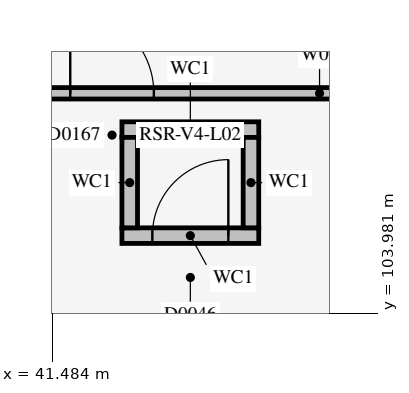
"""IFC4 building model, lengths in metres.
Left out: names, types, materials, properties, quantities, classifications, styles, units other than length and angle.
Written with IfcOpenShell. Run it as: python <this file> out.ifc"""

import sys

from ifc_helpers import new_model, si_unit, direction, frame, frame_2d, origin, place, context, subcontext, project, spatial, rectangle, extrude, element, fill, save


model = new_model("IFC4")
c1 = context("Model", 3, precision=1e-05, world=origin(), true_north=direction((0.0, 1.0)))
c2 = subcontext(c1, "Body", "Model", "MODEL_VIEW")
j1 = project(units=[si_unit("LENGTHUNIT", "METRE"), si_unit("PLANEANGLEUNIT", "RADIAN")], contexts=[c1])
p1 = place(None, origin())
s1 = spatial("IfcSite", under=j1, at=p1, CompositionType="ELEMENT")
p2 = place(p1, origin())
s2 = spatial("IfcBuilding", under=s1, at=p2, CompositionType="ELEMENT")
p3 = place(p2, frame((0.0, 0.0, 10.2)))
s3 = spatial("IfcBuildingStorey", under=s2, at=p3, CompositionType="ELEMENT", Elevation=10.2)
p4 = place(p3, frame((42.4, 105.002, 0.0), z_axis=(0.0, 0.0, 1.0), x_axis=(1.0, 0.0, 0.0)))
e1 = element("IfcWall", 1, at=p4, inside=s3, PredefinedType="SOLIDWALL", context=c2, shape_type="SweptSolid", body=[
    extrude(rectangle(XDim=1.8, YDim=0.205, at=frame_2d((0.9, 0.0))), origin(), (0.0, 0.0, 1.0), 4.235),
])
p5 = place(p4, frame((0.4, 0.0, 0.0)))
e2 = element("IfcOpeningElement", 2, at=p5, cuts=e1, PredefinedType="OPENING", context=c2, shape_type="SweptSolid", body=[
    extrude(rectangle(XDim=1.0, YDim=2.2, at=frame_2d((0.5, 1.1))), frame((0.0, 0.115, 0.0), z_axis=(0.0, -1.0, 0.0), x_axis=(1.0, 0.0, 0.0)), (0.0, 0.0, 1.0), 0.229),
])
p6 = place(p3, frame((42.4, 106.397, 0.0), z_axis=(0.0, 0.0, 1.0), x_axis=(1.0, 0.0, 0.0)))
e3 = element("IfcWall", 3, at=p6, inside=s3, PredefinedType="SOLIDWALL", context=c2, shape_type="SweptSolid", body=[
    extrude(rectangle(XDim=1.8, YDim=0.205, at=frame_2d((0.9, 0.0))), origin(), (0.0, 0.0, 1.0), 4.235),
])
for number, where, z_axis, x_axis in (
    (4, (44.097, 105.105, 0.0), (0.0, 0.0, 1.0), (0.0, 1.0, 0.0)),
    (5, (42.502, 105.105, 0.0), (0.0, 0.0, 1.0), (0.0, 1.0, 0.0)),
):
    element("IfcWall", number, at=place(p3, frame(where, z_axis=z_axis, x_axis=x_axis)), inside=s3, PredefinedType="SOLIDWALL", context=c2, shape_type="SweptSolid", body=[
        extrude(rectangle(XDim=1.19, YDim=0.205, at=frame_2d((0.595, 0.0))), origin(), (0.0, 0.0, 1.0), 4.235),
    ])
p7 = place(p3, frame((38.44, 106.875, 0.0), z_axis=(0.0, 0.0, 1.0), x_axis=(1.0, 0.0, 0.0)))
e6 = element("IfcWall", 6, at=p7, inside=s3, PredefinedType="PARTITIONING", context=c2, shape_type="SweptSolid", body=[
    extrude(rectangle(XDim=13.12, YDim=0.15, at=frame_2d((6.56, 0.0))), origin(), (0.0, 0.0, 1.0), 4.235),
])
p8 = place(p7, frame((3.28, 0.0, 0.0)))
e7 = element("IfcOpeningElement", 7, at=p8, cuts=e6, PredefinedType="OPENING", context=c2, shape_type="SweptSolid", body=[
    extrude(rectangle(XDim=1.1, YDim=2.25, at=frame_2d((0.55, 1.125))), frame((0.0, 0.087, 0.0), z_axis=(0.0, -1.0, 0.0), x_axis=(1.0, 0.0, 0.0)), (0.0, 0.0, 1.0), 0.174),
])
p9 = place(p5, origin())
e8 = element("IfcDoor", 8, at=p9, inside=s3, OperationType="SINGLE_SWING_RIGHT", PredefinedType="DOOR", context=c2, shape_type="SweptSolid", body=[
    extrude(rectangle(XDim=1.0, YDim=2.2, at=frame_2d((0.5, 1.1))), frame((0.0, 0.025, 0.0), z_axis=(0.0, -1.0, 0.0), x_axis=(1.0, 0.0, 0.0)), (0.0, 0.0, 1.0), 0.05),
])
fill(e2, e8)
p10 = place(p8, origin())
e9 = element("IfcDoor", 9, at=p10, inside=s3, OperationType="SINGLE_SWING_LEFT", PredefinedType="DOOR", context=c2, shape_type="SweptSolid", body=[
    extrude(rectangle(XDim=1.1, YDim=2.25, at=frame_2d((0.55, 1.125))), frame((0.0, 0.025, 0.0), z_axis=(0.0, -1.0, 0.0), x_axis=(1.0, 0.0, 0.0)), (0.0, 0.0, 1.0), 0.05),
])
fill(e7, e9)
save(model, sys.argv[1])
